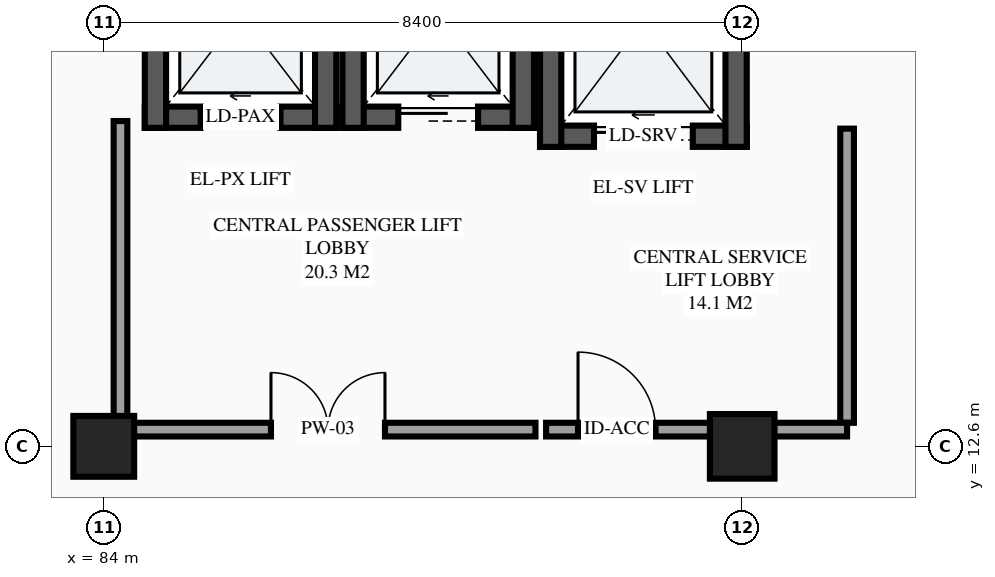
"""IFC4 building model, lengths in metres.
Left out: names, types, materials, properties, quantities, classifications, styles, units other than length and angle.
Written with IfcOpenShell. Run it as: python <this file> out.ifc"""

import sys

from ifc_helpers import new_model, si_unit, direction, frame, frame_2d, origin, origin_2d, place, context, subcontext, project, spatial, rectangle, extrude, element, fill, save


model = new_model("IFC4")
c1 = context("Model", 3, precision=1e-05, world=origin(), true_north=direction((0.0, 1.0)))
c2 = subcontext(c1, "Body", "Model", "MODEL_VIEW")
j1 = project(units=[si_unit("LENGTHUNIT", "METRE"), si_unit("PLANEANGLEUNIT", "RADIAN")], contexts=[c1])
p1 = place(None, origin())
s1 = spatial("IfcSite", under=j1, at=p1, CompositionType="ELEMENT")
p2 = place(p1, origin())
s2 = spatial("IfcBuilding", under=s1, at=p2, CompositionType="ELEMENT")
p3 = place(p2, origin())
s3 = spatial("IfcBuildingStorey", under=s2, at=p3, CompositionType="ELEMENT", Elevation=0.0)
p4 = place(p3, frame((84.0, 12.6, 0.0), z_axis=(0.0, 0.0, 1.0), x_axis=(1.0, 0.0, 0.0)))
e1 = element("IfcColumn", 1, at=p4, inside=s3, PredefinedType="COLUMN", context=c2, shape_type="SweptSolid", body=[
    extrude(rectangle(XDim=0.8, YDim=0.8, at=origin_2d()), origin(), (0.0, 0.0, 1.0), 5.4),
])
p5 = place(p3, frame((92.4, 12.6, 0.0), z_axis=(0.0, 0.0, 1.0), x_axis=(1.0, 0.0, 0.0)))
e2 = element("IfcColumn", 2, at=p5, inside=s3, PredefinedType="COLUMN", context=c2, shape_type="SweptSolid", body=[
    extrude(rectangle(XDim=0.85, YDim=0.85, at=origin_2d()), origin(), (0.0, 0.0, 1.0), 5.4),
])
p6 = place(p3, frame((84.54, 16.93, 0.0), z_axis=(0.0, 0.0, 1.0), x_axis=(1.0, 0.0, 0.0)))
e3 = element("IfcWall", 3, at=p6, inside=s3, PredefinedType="SHEAR", context=c2, shape_type="SweptSolid", body=[
    extrude(rectangle(XDim=2.52, YDim=0.28, at=frame_2d((1.26, 0.0))), origin(), (0.0, 0.0, 1.0), 5.4),
])
p7 = place(p6, frame((0.735, 0.0, 0.0)))
e4 = element("IfcOpeningElement", 4, at=p7, cuts=e3, PredefinedType="OPENING", context=c2, shape_type="SweptSolid", body=[
    extrude(rectangle(XDim=1.05, YDim=2.2, at=frame_2d((0.525, 1.1))), frame((0.0, 0.15, 0.0), z_axis=(0.0, -1.0, 0.0), x_axis=(1.0, 0.0, 0.0)), (0.0, 0.0, 1.0), 0.3),
])
for number, where, z_axis, x_axis in (
    (5, (86.92, 16.79, 0.0), (0.0, 0.0, 1.0), (0.0, 1.0, 0.0)),
    (6, (84.68, 19.81, 0.0), (0.0, 0.0, 1.0), (0.0, -1.0, 0.0)),
):
    element("IfcWall", number, at=place(p3, frame(where, z_axis=z_axis, x_axis=x_axis)), inside=s3, PredefinedType="SHEAR", context=c2, shape_type="SweptSolid", body=[
        extrude(rectangle(XDim=3.02, YDim=0.28, at=frame_2d((1.51, 0.0))), origin(), (0.0, 0.0, 1.0), 5.4),
    ])
p8 = place(p3, frame((87.14, 16.93, 0.0), z_axis=(0.0, 0.0, 1.0), x_axis=(1.0, 0.0, 0.0)))
e7 = element("IfcWall", 7, at=p8, inside=s3, PredefinedType="SHEAR", context=c2, shape_type="SweptSolid", body=[
    extrude(rectangle(XDim=2.52, YDim=0.28, at=frame_2d((1.26, 0.0))), origin(), (0.0, 0.0, 1.0), 5.4),
])
p9 = place(p8, frame((0.735, 0.0, 0.0)))
e8 = element("IfcOpeningElement", 8, at=p9, cuts=e7, PredefinedType="OPENING", context=c2, shape_type="SweptSolid", body=[
    extrude(rectangle(XDim=1.05, YDim=2.2, at=frame_2d((0.525, 1.1))), frame((0.0, 0.15, 0.0), z_axis=(0.0, -1.0, 0.0), x_axis=(1.0, 0.0, 0.0)), (0.0, 0.0, 1.0), 0.3),
])
for number, where, z_axis, x_axis in (
    (9, (89.52, 16.79, 0.0), (0.0, 0.0, 1.0), (0.0, 1.0, 0.0)),
    (10, (87.28, 19.81, 0.0), (0.0, 0.0, 1.0), (0.0, -1.0, 0.0)),
):
    element("IfcWall", number, at=place(p3, frame(where, z_axis=z_axis, x_axis=x_axis)), inside=s3, PredefinedType="SHEAR", context=c2, shape_type="SweptSolid", body=[
        extrude(rectangle(XDim=3.02, YDim=0.28, at=frame_2d((1.51, 0.0))), origin(), (0.0, 0.0, 1.0), 5.4),
    ])
p10 = place(p3, frame((89.74, 16.68, 0.0), z_axis=(0.0, 0.0, 1.0), x_axis=(1.0, 0.0, 0.0)))
e11 = element("IfcWall", 11, at=p10, inside=s3, PredefinedType="SHEAR", context=c2, shape_type="SweptSolid", body=[
    extrude(rectangle(XDim=2.72, YDim=0.28, at=frame_2d((1.36, 0.0))), origin(), (0.0, 0.0, 1.0), 5.4),
])
p11 = place(p10, frame((0.71, 0.0, 0.0)))
e12 = element("IfcOpeningElement", 12, at=p11, cuts=e11, PredefinedType="OPENING", context=c2, shape_type="SweptSolid", body=[
    extrude(rectangle(XDim=1.3, YDim=2.25, at=frame_2d((0.65, 1.125))), frame((0.0, 0.15, 0.0), z_axis=(0.0, -1.0, 0.0), x_axis=(1.0, 0.0, 0.0)), (0.0, 0.0, 1.0), 0.3),
])
for number, where, z_axis, x_axis in (
    (13, (92.32, 16.54, 0.0), (0.0, 0.0, 1.0), (0.0, 1.0, 0.0)),
    (14, (89.88, 19.86, 0.0), (0.0, 0.0, 1.0), (0.0, -1.0, 0.0)),
):
    element("IfcWall", number, at=place(p3, frame(where, z_axis=z_axis, x_axis=x_axis)), inside=s3, PredefinedType="SHEAR", context=c2, shape_type="SweptSolid", body=[
        extrude(rectangle(XDim=3.32, YDim=0.28, at=frame_2d((1.66, 0.0))), origin(), (0.0, 0.0, 1.0), 5.4),
    ])
p12 = place(p3, frame((84.22, 12.82, 0.0), z_axis=(0.0, 0.0, 1.0), x_axis=(1.0, 0.0, 0.0)))
e15 = element("IfcWall", 15, at=p12, inside=s3, PredefinedType="PARTITIONING", context=c2, shape_type="SweptSolid", body=[
    extrude(rectangle(XDim=5.46, YDim=0.18, at=frame_2d((2.73, 0.0))), origin(), (0.0, 0.0, 1.0), 4.39),
])
p13 = place(p12, frame((1.98, 0.0, 0.0)))
e16 = element("IfcOpeningElement", 16, at=p13, cuts=e15, PredefinedType="OPENING", context=c2, shape_type="SweptSolid", body=[
    extrude(rectangle(XDim=1.5, YDim=2.15, at=frame_2d((0.75, 1.075))), frame((0.0, 0.1, 0.0), z_axis=(0.0, -1.0, 0.0), x_axis=(1.0, 0.0, 0.0)), (0.0, 0.0, 1.0), 0.2),
])
p14 = place(p3, frame((84.22, 12.91, 0.0), z_axis=(0.0, 0.0, 1.0), x_axis=(0.0, 1.0, 0.0)))
e17 = element("IfcWall", 17, at=p14, inside=s3, PredefinedType="PARTITIONING", context=c2, shape_type="SweptSolid", body=[
    extrude(rectangle(XDim=3.97, YDim=0.18, at=frame_2d((1.985, 0.0))), origin(), (0.0, 0.0, 1.0), 4.29),
])
p15 = place(p3, frame((89.82, 12.82, 0.0), z_axis=(0.0, 0.0, 1.0), x_axis=(1.0, 0.0, 0.0)))
e18 = element("IfcWall", 18, at=p15, inside=s3, PredefinedType="PARTITIONING", context=c2, shape_type="SweptSolid", body=[
    extrude(rectangle(XDim=2.58, YDim=0.18, at=frame_2d((1.29, 0.0))), origin(), (0.0, 0.0, 1.0), 4.39),
])
p16 = place(p15, frame((0.42, 0.0, 0.0)))
e19 = element("IfcOpeningElement", 19, at=p16, cuts=e18, PredefinedType="OPENING", context=c2, shape_type="SweptSolid", body=[
    extrude(rectangle(XDim=1.02, YDim=2.15, at=frame_2d((0.51, 1.075))), frame((0.0, 0.1, 0.0), z_axis=(0.0, -1.0, 0.0), x_axis=(1.0, 0.0, 0.0)), (0.0, 0.0, 1.0), 0.2),
])
p17 = place(p3, frame((93.78, 12.91, 0.0), z_axis=(0.0, 0.0, 1.0), x_axis=(0.0, 1.0, 0.0)))
e20 = element("IfcWall", 20, at=p17, inside=s3, PredefinedType="PARTITIONING", context=c2, shape_type="SweptSolid", body=[
    extrude(rectangle(XDim=3.87, YDim=0.18, at=frame_2d((1.935, 0.0))), origin(), (0.0, 0.0, 1.0), 5.135),
])
p18 = place(p3, frame((92.4, 12.82, 0.0), z_axis=(0.0, 0.0, 1.0), x_axis=(1.0, 0.0, 0.0)))
e21 = element("IfcWall", 21, at=p18, inside=s3, PredefinedType="PARTITIONING", context=c2, shape_type="SweptSolid", body=[
    extrude(rectangle(XDim=1.38, YDim=0.18, at=frame_2d((0.69, 0.0))), origin(), (0.0, 0.0, 1.0), 4.49),
])
p19 = place(p7, origin())
e22 = element("IfcDoor", 22, at=p19, inside=s3, OperationType="SLIDING_TO_LEFT", PredefinedType="DOOR", context=c2, shape_type="SweptSolid", body=[
    extrude(rectangle(XDim=1.05, YDim=2.2, at=frame_2d((0.525, 1.1))), frame((0.0, 0.025, 0.0), z_axis=(0.0, -1.0, 0.0), x_axis=(1.0, 0.0, 0.0)), (0.0, 0.0, 1.0), 0.05),
])
fill(e4, e22)
p20 = place(p9, origin())
e23 = element("IfcDoor", 23, at=p20, inside=s3, OperationType="SLIDING_TO_LEFT", PredefinedType="DOOR", context=c2, shape_type="SweptSolid", body=[
    extrude(rectangle(XDim=1.05, YDim=2.2, at=frame_2d((0.525, 1.1))), frame((0.0, 0.025, 0.0), z_axis=(0.0, -1.0, 0.0), x_axis=(1.0, 0.0, 0.0)), (0.0, 0.0, 1.0), 0.05),
])
fill(e8, e23)
p21 = place(p11, origin())
e24 = element("IfcDoor", 24, at=p21, inside=s3, OperationType="SLIDING_TO_LEFT", PredefinedType="DOOR", context=c2, shape_type="SweptSolid", body=[
    extrude(rectangle(XDim=1.3, YDim=2.25, at=frame_2d((0.65, 1.125))), frame((0.0, 0.025, 0.0), z_axis=(0.0, -1.0, 0.0), x_axis=(1.0, 0.0, 0.0)), (0.0, 0.0, 1.0), 0.05),
])
fill(e12, e24)
p22 = place(p13, origin())
e25 = element("IfcDoor", 25, at=p22, inside=s3, OperationType="DOUBLE_DOOR_SINGLE_SWING", PredefinedType="DOOR", context=c2, shape_type="SweptSolid", body=[
    extrude(rectangle(XDim=1.5, YDim=2.15, at=frame_2d((0.75, 1.075))), frame((0.0, 0.025, 0.0), z_axis=(0.0, -1.0, 0.0), x_axis=(1.0, 0.0, 0.0)), (0.0, 0.0, 1.0), 0.05),
])
fill(e16, e25)
p23 = place(p16, origin())
e26 = element("IfcDoor", 26, at=p23, inside=s3, OperationType="SINGLE_SWING_LEFT", PredefinedType="DOOR", context=c2, shape_type="SweptSolid", body=[
    extrude(rectangle(XDim=1.02, YDim=2.15, at=frame_2d((0.51, 1.075))), frame((0.0, 0.025, 0.0), z_axis=(0.0, -1.0, 0.0), x_axis=(1.0, 0.0, 0.0)), (0.0, 0.0, 1.0), 0.05),
])
fill(e19, e26)
save(model, sys.argv[1])
